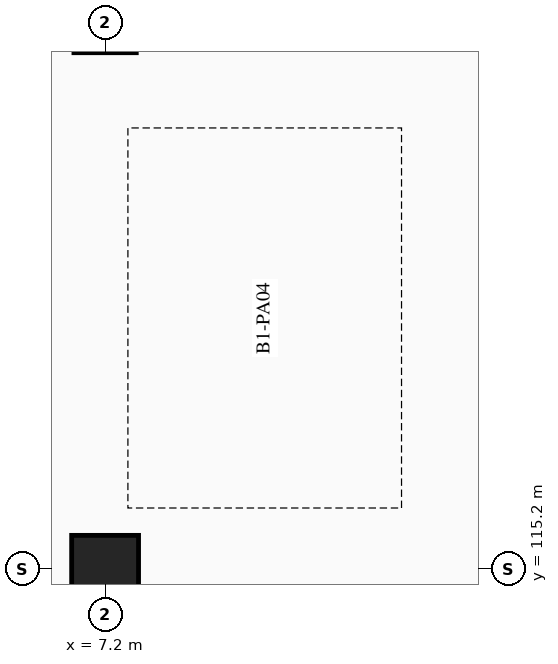
"""IFC4 building model, lengths in metres.
Left out: names, types, materials, properties, quantities, classifications, styles, units other than length and angle.
Written with IfcOpenShell. Run it as: python <this file> out.ifc"""

import sys

from ifc_helpers import new_model, si_unit, direction, frame, origin, origin_2d, place, context, subcontext, project, spatial, rectangle, extrude, element, save


model = new_model("IFC4")
c1 = context("Model", 3, precision=1e-05, world=origin(), true_north=direction((0.0, 1.0)))
c2 = subcontext(c1, "Body", "Model", "MODEL_VIEW")
j1 = project(units=[si_unit("LENGTHUNIT", "METRE"), si_unit("PLANEANGLEUNIT", "RADIAN")], contexts=[c1])
p1 = place(None, origin())
s1 = spatial("IfcSite", under=j1, at=p1, CompositionType="ELEMENT")
p2 = place(p1, origin())
s2 = spatial("IfcBuilding", under=s1, at=p2, CompositionType="ELEMENT")
p3 = place(p2, frame((0.0, 0.0, -4.5)))
s3 = spatial("IfcBuildingStorey", under=s2, at=p3, CompositionType="ELEMENT", Elevation=-4.5)
p4 = place(p3, frame((7.2, 115.2, -0.45), z_axis=(0.0, 0.0, 1.0), x_axis=(1.0, 0.0, 0.0)))
e1 = element("IfcColumn", 1, at=p4, inside=s3, PredefinedType="COLUMN", context=c2, shape_type="SweptSolid", body=[
    extrude(rectangle(XDim=0.88, YDim=0.88, at=origin_2d()), origin(), (0.0, 0.0, 1.0), 4.95),
])
p5 = place(p3, frame((7.2, 122.4, -0.45), z_axis=(0.0, 0.0, 1.0), x_axis=(1.0, 0.0, 0.0)))
e2 = element("IfcColumn", 2, at=p5, inside=s3, PredefinedType="COLUMN", context=c2, shape_type="SweptSolid", body=[
    extrude(rectangle(XDim=0.82, YDim=0.82, at=origin_2d()), origin(), (0.0, 0.0, 1.0), 4.95),
])
save(model, sys.argv[1])
